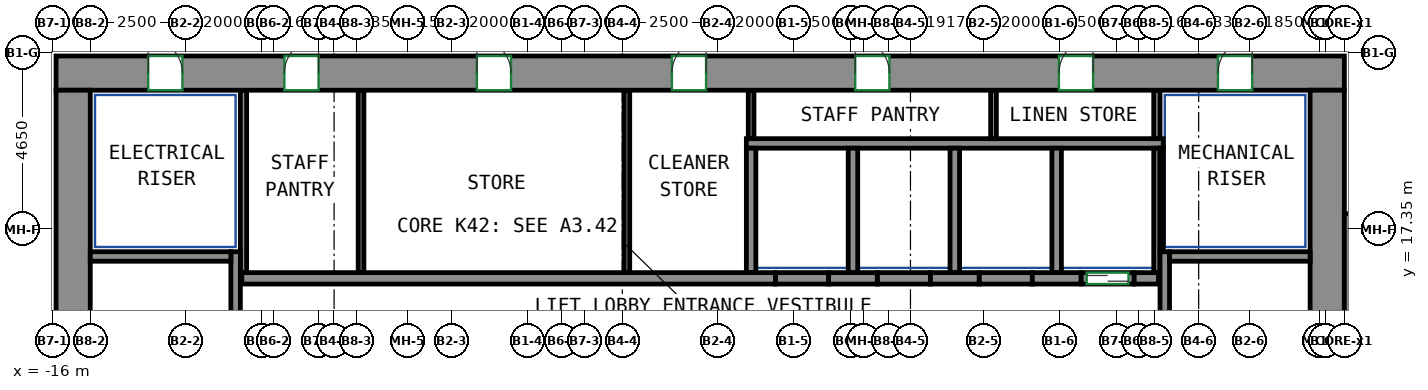
"""IFC4 building model, lengths in metres.
Left out: names, types, materials, properties, quantities, classifications, styles, units other than length and angle.
Written with IfcOpenShell. Run it as: python <this file> out.ifc"""

import sys

from ifc_helpers import new_model, si_unit, direction, frame, frame_2d, origin, place, context, subcontext, project, spatial, rectangle, extrude, source, transform, mapped, element, fill, save


model = new_model("IFC4")
c1 = context("Model", 3, precision=1e-05, world=origin(), true_north=direction((0.0, 1.0)))
c2 = subcontext(c1, "Body", "Model", "MODEL_VIEW")
j1 = project(units=[si_unit("LENGTHUNIT", "METRE"), si_unit("PLANEANGLEUNIT", "RADIAN")], contexts=[c1])
p1 = place(None, origin())
s1 = spatial("IfcSite", under=j1, at=p1, CompositionType="ELEMENT")
p2 = place(p1, origin())
s2 = spatial("IfcBuilding", under=s1, at=p2, CompositionType="ELEMENT")
p3 = place(p2, frame((0.0, 0.0, 175.3)))
s3 = spatial("IfcBuildingStorey", under=s2, at=p3, CompositionType="ELEMENT", Elevation=175.3)
m1 = source(origin(), c2, "Body", "SweptSolid", [
    extrude(rectangle(XDim=33.9, YDim=0.9, at=frame_2d((16.95, 0.0))), origin(), (0.0, 0.0, 1.0), 3.12),
])
p4 = place(p3, frame((-15.9, 21.45, 0.0), z_axis=(0.0, 0.0, 1.0), x_axis=(1.0, 0.0, 0.0)))
e1 = element("IfcWall", 1, at=p4, inside=s3, PredefinedType="SHEAR", context=c2, shape_type="MappedRepresentation", body=[
    mapped(m1, transform((0.0, 0.0, 0.0))),
])
p5 = place(p4, frame((6.008, 0.0, 0.0)))
e2 = element("IfcOpeningElement", 2, at=p5, cuts=e1, PredefinedType="OPENING", context=c2, shape_type="SweptSolid", body=[
    extrude(rectangle(XDim=0.9, YDim=2.1, at=frame_2d((0.45, 1.05))), frame((0.0, 0.46, 0.0), z_axis=(0.0, -1.0, 0.0), x_axis=(1.0, 0.0, 0.0)), (0.0, 0.0, 1.0), 0.92),
])
p6 = place(p4, frame((11.073, 0.0, 0.0)))
e3 = element("IfcOpeningElement", 3, at=p6, cuts=e1, PredefinedType="OPENING", context=c2, shape_type="SweptSolid", body=[
    extrude(rectangle(XDim=0.9, YDim=2.1, at=frame_2d((0.45, 1.05))), frame((0.0, 0.46, 0.0), z_axis=(0.0, -1.0, 0.0), x_axis=(1.0, 0.0, 0.0)), (0.0, 0.0, 1.0), 0.92),
])
p7 = place(p4, frame((16.205, 0.0, 0.0)))
e4 = element("IfcOpeningElement", 4, at=p7, cuts=e1, PredefinedType="OPENING", context=c2, shape_type="SweptSolid", body=[
    extrude(rectangle(XDim=0.9, YDim=2.1, at=frame_2d((0.45, 1.05))), frame((0.0, 0.46, 0.0), z_axis=(0.0, -1.0, 0.0), x_axis=(1.0, 0.0, 0.0)), (0.0, 0.0, 1.0), 0.92),
])
p8 = place(p4, frame((21.029, 0.0, 0.0)))
e5 = element("IfcOpeningElement", 5, at=p8, cuts=e1, PredefinedType="OPENING", context=c2, shape_type="SweptSolid", body=[
    extrude(rectangle(XDim=0.9, YDim=2.1, at=frame_2d((0.45, 1.05))), frame((0.0, 0.46, 0.0), z_axis=(0.0, -1.0, 0.0), x_axis=(1.0, 0.0, 0.0)), (0.0, 0.0, 1.0), 0.92),
])
p9 = place(p4, frame((26.389, 0.0, 0.0)))
e6 = element("IfcOpeningElement", 6, at=p9, cuts=e1, PredefinedType="OPENING", context=c2, shape_type="SweptSolid", body=[
    extrude(rectangle(XDim=0.9, YDim=2.1, at=frame_2d((0.45, 1.05))), frame((0.0, 0.46, 0.0), z_axis=(0.0, -1.0, 0.0), x_axis=(1.0, 0.0, 0.0)), (0.0, 0.0, 1.0), 0.92),
])
p10 = place(p4, frame((2.425, 0.0, 0.0)))
e7 = element("IfcOpeningElement", 7, at=p10, cuts=e1, PredefinedType="OPENING", context=c2, shape_type="SweptSolid", body=[
    extrude(rectangle(XDim=0.9, YDim=2.1, at=frame_2d((0.45, 1.05))), frame((0.0, 0.46, 0.0), z_axis=(0.0, -1.0, 0.0), x_axis=(1.0, 0.0, 0.0)), (0.0, 0.0, 1.0), 0.92),
])
p11 = place(p4, frame((30.575, 0.0, 0.0)))
e8 = element("IfcOpeningElement", 8, at=p11, cuts=e1, PredefinedType="OPENING", context=c2, shape_type="SweptSolid", body=[
    extrude(rectangle(XDim=0.9, YDim=2.1, at=frame_2d((0.45, 1.05))), frame((0.0, 0.46, 0.0), z_axis=(0.0, -1.0, 0.0), x_axis=(1.0, 0.0, 0.0)), (0.0, 0.0, 1.0), 0.92),
])
m2 = source(origin(), c2, "Body", "SweptSolid", [
    extrude(rectangle(XDim=12.0, YDim=0.9, at=frame_2d((6.0, 0.0))), origin(), (0.0, 0.0, 1.0), 3.12),
])
for number, where, z_axis, x_axis in (
    (9, (-15.45, 9.0, 0.0), (0.0, 0.0, 1.0), (0.0, 1.0, 0.0)),
    (10, (17.55, 9.0, 0.0), (0.0, 0.0, 1.0), (0.0, 1.0, 0.0)),
):
    element("IfcWall", number, at=place(p3, frame(where, z_axis=z_axis, x_axis=x_axis)), inside=s3, PredefinedType="SHEAR", context=c2, shape_type="MappedRepresentation", body=[
        mapped(m2, transform((0.0, 0.0, 0.0))),
    ])
m3 = source(origin(), c2, "Body", "SweptSolid", [
    extrude(rectangle(XDim=7.75, YDim=0.25, at=frame_2d((3.875, 0.0))), origin(), (0.0, 0.0, 1.0), 3.12),
])
p12 = place(p3, frame((-11.175, 9.0, 0.0), z_axis=(0.0, 0.0, 1.0), x_axis=(0.0, 1.0, 0.0)))
e11 = element("IfcWall", 11, at=p12, inside=s3, PredefinedType="SHEAR", context=c2, shape_type="MappedRepresentation", body=[
    mapped(m3, transform((0.0, 0.0, 0.0))),
])
m4 = source(origin(), c2, "Body", "SweptSolid", [
    extrude(rectangle(XDim=3.7, YDim=0.25, at=frame_2d((1.85, 0.0))), origin(), (0.0, 0.0, 1.0), 3.12),
])
p13 = place(p3, frame((-15.0, 16.625, 0.0), z_axis=(0.0, 0.0, 1.0), x_axis=(1.0, 0.0, 0.0)))
e12 = element("IfcWall", 12, at=p13, inside=s3, PredefinedType="SHEAR", context=c2, shape_type="MappedRepresentation", body=[
    mapped(m4, transform((0.0, 0.0, 0.0))),
])
p14 = place(p3, frame((13.275, 9.0, 0.0), z_axis=(0.0, 0.0, 1.0), x_axis=(0.0, 1.0, 0.0)))
e13 = element("IfcWall", 13, at=p14, inside=s3, PredefinedType="SHEAR", context=c2, shape_type="MappedRepresentation", body=[
    mapped(m3, transform((0.0, 0.0, 0.0))),
])
m5 = source(origin(), c2, "Body", "SweptSolid", [
    extrude(rectangle(XDim=3.7, YDim=0.25, at=frame_2d((1.85, 0.0))), origin(), (0.0, 0.0, 1.0), 3.12),
])
p15 = place(p3, frame((13.4, 16.625, 0.0), z_axis=(0.0, 0.0, 1.0), x_axis=(1.0, 0.0, 0.0)))
e14 = element("IfcWall", 14, at=p15, inside=s3, PredefinedType="SHEAR", context=c2, shape_type="MappedRepresentation", body=[
    mapped(m5, transform((0.0, 0.0, 0.0))),
])
m6 = source(origin(), c2, "Body", "SweptSolid", [
    extrude(rectangle(XDim=8.0, YDim=0.35, at=frame_2d((4.0, 0.0))), origin(), (0.0, 0.0, 1.0), 3.12),
])
p16 = place(p3, frame((18.175, 9.75, 0.0), z_axis=(0.0, 0.0, 1.0), x_axis=(0.0, 1.0, 0.0)))
e15 = element("IfcWall", 15, at=p16, inside=s3, PredefinedType="SHEAR", context=c2, shape_type="MappedRepresentation", body=[
    mapped(m6, transform((0.0, 0.0, 0.0))),
])
m7 = source(origin(), c2, "Body", "SweptSolid", [
    extrude(rectangle(XDim=14.04, YDim=0.3, at=frame_2d((7.02, 0.0))), origin(), (0.0, 0.0, 1.0), 3.12),
])
p17 = place(p3, frame((-11.01, 16.05, 0.0), z_axis=(0.0, 0.0, 1.0), x_axis=(1.0, 0.0, 0.0)))
e16 = element("IfcWall", 16, at=p17, inside=s3, PredefinedType="SHEAR", context=c2, shape_type="MappedRepresentation", body=[
    mapped(m7, transform((0.0, 0.0, 0.0))),
])
m8 = source(origin(), c2, "Body", "SweptSolid", [
    extrude(rectangle(XDim=1.28, YDim=0.3, at=frame_2d((0.64, 0.0))), origin(), (0.0, 0.0, 1.0), 3.12),
])
p18 = place(p3, frame((4.43, 16.05, 0.0), z_axis=(0.0, 0.0, 1.0), x_axis=(1.0, 0.0, 0.0)))
e17 = element("IfcWall", 17, at=p18, inside=s3, PredefinedType="SHEAR", context=c2, shape_type="MappedRepresentation", body=[
    mapped(m8, transform((0.0, 0.0, 0.0))),
])
m9 = source(origin(), c2, "Body", "SweptSolid", [
    extrude(rectangle(XDim=1.28, YDim=0.3, at=frame_2d((0.64, 0.0))), origin(), (0.0, 0.0, 1.0), 3.12),
])
p19 = place(p3, frame((7.11, 16.05, 0.0), z_axis=(0.0, 0.0, 1.0), x_axis=(1.0, 0.0, 0.0)))
e18 = element("IfcWall", 18, at=p19, inside=s3, PredefinedType="SHEAR", context=c2, shape_type="MappedRepresentation", body=[
    mapped(m9, transform((0.0, 0.0, 0.0))),
])
p20 = place(p3, frame((9.79, 16.05, 0.0), z_axis=(0.0, 0.0, 1.0), x_axis=(1.0, 0.0, 0.0)))
e19 = element("IfcWall", 19, at=p20, inside=s3, PredefinedType="SHEAR", context=c2, shape_type="MappedRepresentation", body=[
    mapped(m8, transform((0.0, 0.0, 0.0))),
])
m10 = source(origin(), c2, "Body", "SweptSolid", [
    extrude(rectangle(XDim=0.64, YDim=0.3, at=frame_2d((0.32, 0.0))), origin(), (0.0, 0.0, 1.0), 3.12),
])
p21 = place(p3, frame((12.47, 16.05, 0.0), z_axis=(0.0, 0.0, 1.0), x_axis=(1.0, 0.0, 0.0)))
e20 = element("IfcWall", 20, at=p21, inside=s3, PredefinedType="SHEAR", context=c2, shape_type="MappedRepresentation", body=[
    mapped(m10, transform((0.0, 0.0, 0.0))),
])
m11 = source(origin(), c2, "Body", "SweptSolid", [
    extrude(rectangle(XDim=1.4, YDim=0.3, at=frame_2d((0.7, 0.0))), origin(), (0.0, 0.0, 1.0), 3.12),
])
p22 = place(p3, frame((11.07, 16.05, 0.0), z_axis=(0.0, 0.0, 1.0), x_axis=(1.0, 0.0, 0.0)))
e21 = element("IfcWall", 21, at=p22, inside=s3, PredefinedType="PARTITIONING", context=c2, shape_type="MappedRepresentation", body=[
    mapped(m11, transform((0.0, 0.0, 0.0))),
])
p23 = place(p22, frame((0.15, 0.0, 0.0)))
e22 = element("IfcOpeningElement", 22, at=p23, cuts=e21, PredefinedType="OPENING", context=c2, shape_type="SweptSolid", body=[
    extrude(rectangle(XDim=1.1, YDim=2.1, at=frame_2d((0.55, 1.05))), frame((0.0, 0.16, 0.0), z_axis=(0.0, -1.0, 0.0), x_axis=(1.0, 0.0, 0.0)), (0.0, 0.0, 1.0), 0.32),
])
p24 = place(p3, frame((3.03, 16.05, 0.0), z_axis=(0.0, 0.0, 1.0), x_axis=(1.0, 0.0, 0.0)))
e23 = element("IfcWall", 23, at=p24, inside=s3, PredefinedType="PARTITIONING", context=c2, shape_type="MappedRepresentation", body=[
    mapped(m11, transform((0.0, 0.0, 0.0))),
])
m12 = source(origin(), c2, "Body", "SweptSolid", [
    extrude(rectangle(XDim=1.4, YDim=0.3, at=frame_2d((0.7, 0.0))), origin(), (0.0, 0.0, 1.0), 3.12),
])
for number, where, z_axis, x_axis in (
    (24, (5.71, 16.05, 0.0), (0.0, 0.0, 1.0), (1.0, 0.0, 0.0)),
    (25, (8.39, 16.05, 0.0), (0.0, 0.0, 1.0), (1.0, 0.0, 0.0)),
):
    element("IfcWall", number, at=place(p3, frame(where, z_axis=z_axis, x_axis=x_axis)), inside=s3, PredefinedType="PARTITIONING", context=c2, shape_type="MappedRepresentation", body=[
        mapped(m12, transform((0.0, 0.0, 0.0))),
    ])
m13 = source(origin(), c2, "Body", "SweptSolid", [
    extrude(rectangle(XDim=10.97, YDim=0.25, at=frame_2d((5.485, 0.0))), origin(), (0.0, 0.0, 1.0), 3.12),
])
p25 = place(p3, frame((2.265, 19.6, 0.0), z_axis=(0.0, 0.0, 1.0), x_axis=(1.0, 0.0, 0.0)))
e26 = element("IfcWall", 26, at=p25, inside=s3, PredefinedType="PARTITIONING", context=c2, shape_type="MappedRepresentation", body=[
    mapped(m13, transform((0.0, 0.0, 0.0))),
])
m14 = source(origin(), c2, "Body", "SweptSolid", [
    extrude(rectangle(XDim=3.275, YDim=0.165, at=frame_2d((1.638, 0.0))), origin(), (0.0, 0.0, 1.0), 3.12),
])
p26 = place(p3, frame((13.067, 16.2, 0.0), z_axis=(0.0, 0.0, 1.0), x_axis=(0.0, 1.0, 0.0)))
e27 = element("IfcWall", 27, at=p26, inside=s3, PredefinedType="PARTITIONING", context=c2, shape_type="MappedRepresentation", body=[
    mapped(m14, transform((0.0, 0.0, 0.0))),
])
m15 = source(origin(), c2, "Body", "SweptSolid", [
    extrude(rectangle(XDim=1.275, YDim=0.165, at=frame_2d((0.637, 0.0))), origin(), (0.0, 0.0, 1.0), 3.12),
])
p27 = place(p3, frame((13.067, 19.725, 0.0), z_axis=(0.0, 0.0, 1.0), x_axis=(0.0, 1.0, 0.0)))
e28 = element("IfcWall", 28, at=p27, inside=s3, PredefinedType="PARTITIONING", context=c2, shape_type="MappedRepresentation", body=[
    mapped(m15, transform((0.0, 0.0, 0.0))),
])
m16 = source(origin(), c2, "Body", "SweptSolid", [
    extrude(rectangle(XDim=4.8, YDim=0.165, at=frame_2d((2.4, 0.0))), origin(), (0.0, 0.0, 1.0), 3.12),
])
p28 = place(p3, frame((-10.968, 16.2, 0.0), z_axis=(0.0, 0.0, 1.0), x_axis=(0.0, 1.0, 0.0)))
e29 = element("IfcWall", 29, at=p28, inside=s3, PredefinedType="PARTITIONING", context=c2, shape_type="MappedRepresentation", body=[
    mapped(m16, transform((0.0, 0.0, 0.0))),
])
m17 = source(origin(), c2, "Body", "SweptSolid", [
    extrude(rectangle(XDim=3.275, YDim=0.25, at=frame_2d((1.638, 0.0))), origin(), (0.0, 0.0, 1.0), 3.12),
])
p29 = place(p3, frame((10.43, 16.2, 0.0), z_axis=(0.0, 0.0, 1.0), x_axis=(0.0, 1.0, 0.0)))
e30 = element("IfcWall", 30, at=p29, inside=s3, PredefinedType="PARTITIONING", context=c2, shape_type="MappedRepresentation", body=[
    mapped(m17, transform((0.0, 0.0, 0.0))),
])
m18 = source(origin(), c2, "Body", "SweptSolid", [
    extrude(rectangle(XDim=2.725, YDim=0.085, at=frame_2d((1.363, 0.0))), origin(), (0.0, 0.0, 1.0), 3.12),
])
p30 = place(p3, frame((13.192, 16.75, 0.0), z_axis=(0.0, 0.0, 1.0), x_axis=(0.0, 1.0, 0.0)))
e31 = element("IfcWall", 31, at=p30, inside=s3, PredefinedType="PARTITIONING", context=c2, shape_type="MappedRepresentation", body=[
    mapped(m18, transform((0.0, 0.0, 0.0))),
])
for number, where, z_axis, x_axis in (
    (32, (2.39, 16.2, 0.0), (0.0, 0.0, 1.0), (0.0, 1.0, 0.0)),
    (33, (5.07, 16.2, 0.0), (0.0, 0.0, 1.0), (0.0, 1.0, 0.0)),
    (34, (7.75, 16.2, 0.0), (0.0, 0.0, 1.0), (0.0, 1.0, 0.0)),
):
    element("IfcWall", number, at=place(p3, frame(where, z_axis=z_axis, x_axis=x_axis)), inside=s3, PredefinedType="PARTITIONING", context=c2, shape_type="MappedRepresentation", body=[
        mapped(m17, transform((0.0, 0.0, 0.0))),
    ])
m19 = source(origin(), c2, "Body", "SweptSolid", [
    extrude(rectangle(XDim=4.8, YDim=0.15, at=frame_2d((2.4, 0.0))), origin(), (0.0, 0.0, 1.0), 3.12),
])
for number, where, z_axis, x_axis in (
    (35, (-7.875, 16.2, 0.0), (0.0, 0.0, 1.0), (0.0, 1.0, 0.0)),
    (36, (-0.88, 16.2, 0.0), (0.0, 0.0, 1.0), (0.0, 1.0, 0.0)),
):
    element("IfcWall", number, at=place(p3, frame(where, z_axis=z_axis, x_axis=x_axis)), inside=s3, PredefinedType="PARTITIONING", context=c2, shape_type="MappedRepresentation", body=[
        mapped(m19, transform((0.0, 0.0, 0.0))),
    ])
m20 = source(origin(), c2, "Body", "SweptSolid", [
    extrude(rectangle(XDim=1.275, YDim=0.15, at=frame_2d((0.637, 0.0))), origin(), (0.0, 0.0, 1.0), 3.12),
])
for number, where, z_axis, x_axis in (
    (37, (2.39, 19.725, 0.0), (0.0, 0.0, 1.0), (0.0, 1.0, 0.0)),
    (38, (8.768, 19.725, 0.0), (0.0, 0.0, 1.0), (0.0, 1.0, 0.0)),
):
    element("IfcWall", number, at=place(p3, frame(where, z_axis=z_axis, x_axis=x_axis)), inside=s3, PredefinedType="PARTITIONING", context=c2, shape_type="MappedRepresentation", body=[
        mapped(m20, transform((0.0, 0.0, 0.0))),
    ])
p31 = place(p23, origin())
e39 = element("IfcDoor", 39, at=p31, inside=s3, OperationType="DOUBLE_DOOR_SLIDING", PredefinedType="DOOR", context=c2, shape_type="SweptSolid", body=[
    extrude(rectangle(XDim=1.1, YDim=2.1, at=frame_2d((0.55, 1.05))), frame((0.0, 0.025, 0.0), z_axis=(0.0, -1.0, 0.0), x_axis=(1.0, 0.0, 0.0)), (0.0, 0.0, 1.0), 0.05),
])
fill(e22, e39)
p32 = place(p5, origin())
e40 = element("IfcDoor", 40, at=p32, inside=s3, OperationType="SINGLE_SWING_RIGHT", PredefinedType="DOOR", context=c2, shape_type="SweptSolid", body=[
    extrude(rectangle(XDim=0.9, YDim=2.1, at=frame_2d((0.45, 1.05))), frame((0.0, -0.305, 0.0), z_axis=(0.0, -1.0, 0.0), x_axis=(1.0, 0.0, 0.0)), (0.0, 0.0, 1.0), 0.05),
])
fill(e2, e40)
p33 = place(p6, origin())
e41 = element("IfcDoor", 41, at=p33, inside=s3, OperationType="SINGLE_SWING_LEFT", PredefinedType="DOOR", context=c2, shape_type="SweptSolid", body=[
    extrude(rectangle(XDim=0.9, YDim=2.1, at=frame_2d((0.45, 1.05))), frame((0.0, -0.305, 0.0), z_axis=(0.0, -1.0, 0.0), x_axis=(1.0, 0.0, 0.0)), (0.0, 0.0, 1.0), 0.05),
])
fill(e3, e41)
p34 = place(p7, origin())
e42 = element("IfcDoor", 42, at=p34, inside=s3, OperationType="SINGLE_SWING_RIGHT", PredefinedType="DOOR", context=c2, shape_type="SweptSolid", body=[
    extrude(rectangle(XDim=0.9, YDim=2.1, at=frame_2d((0.45, 1.05))), frame((0.0, -0.305, 0.0), z_axis=(0.0, -1.0, 0.0), x_axis=(1.0, 0.0, 0.0)), (0.0, 0.0, 1.0), 0.05),
])
fill(e4, e42)
p35 = place(p8, origin())
e43 = element("IfcDoor", 43, at=p35, inside=s3, OperationType="SINGLE_SWING_LEFT", PredefinedType="DOOR", context=c2, shape_type="SweptSolid", body=[
    extrude(rectangle(XDim=0.9, YDim=2.1, at=frame_2d((0.45, 1.05))), frame((0.0, -0.305, 0.0), z_axis=(0.0, -1.0, 0.0), x_axis=(1.0, 0.0, 0.0)), (0.0, 0.0, 1.0), 0.05),
])
fill(e5, e43)
p36 = place(p9, origin())
e44 = element("IfcDoor", 44, at=p36, inside=s3, OperationType="SINGLE_SWING_RIGHT", PredefinedType="DOOR", context=c2, shape_type="SweptSolid", body=[
    extrude(rectangle(XDim=0.9, YDim=2.1, at=frame_2d((0.45, 1.05))), frame((0.0, -0.305, 0.0), z_axis=(0.0, -1.0, 0.0), x_axis=(1.0, 0.0, 0.0)), (0.0, 0.0, 1.0), 0.05),
])
fill(e6, e44)
p37 = place(p10, origin())
e45 = element("IfcDoor", 45, at=p37, inside=s3, OperationType="SINGLE_SWING_LEFT", PredefinedType="DOOR", context=c2, shape_type="SweptSolid", body=[
    extrude(rectangle(XDim=0.9, YDim=2.1, at=frame_2d((0.45, 1.05))), frame((0.0, -0.305, 0.0), z_axis=(0.0, -1.0, 0.0), x_axis=(1.0, 0.0, 0.0)), (0.0, 0.0, 1.0), 0.05),
])
fill(e7, e45)
p38 = place(p11, origin())
e46 = element("IfcDoor", 46, at=p38, inside=s3, OperationType="SINGLE_SWING_RIGHT", PredefinedType="DOOR", context=c2, shape_type="SweptSolid", body=[
    extrude(rectangle(XDim=0.9, YDim=2.1, at=frame_2d((0.45, 1.05))), frame((0.0, -0.305, 0.0), z_axis=(0.0, -1.0, 0.0), x_axis=(1.0, 0.0, 0.0)), (0.0, 0.0, 1.0), 0.05),
])
fill(e8, e46)
save(model, sys.argv[1])
